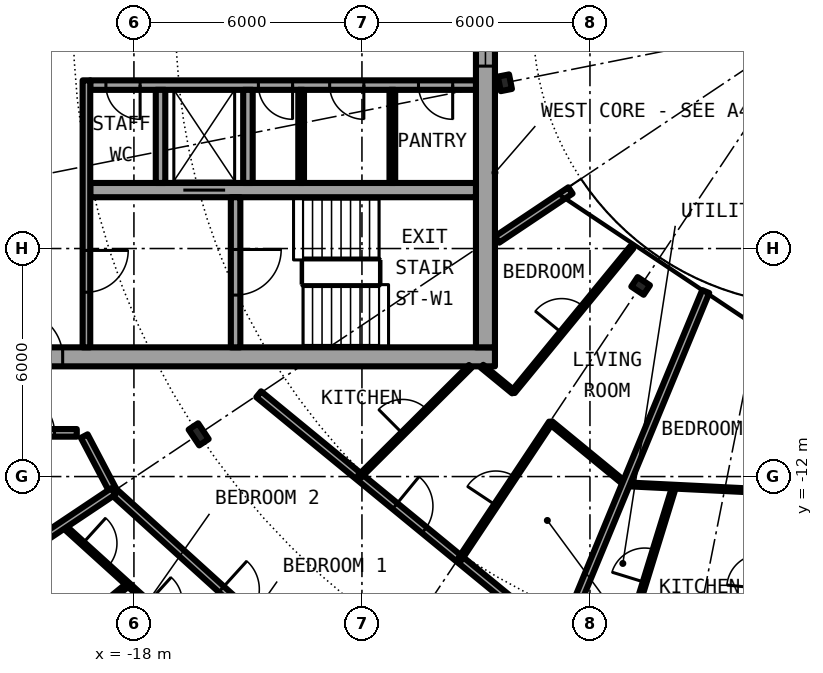
"""IFC4 building model, lengths in metres.
Left out: names, types, materials, properties, quantities, classifications, styles, units other than length and angle.
Written with IfcOpenShell. Run it as: python <this file> out.ifc"""

import sys

from ifc_helpers import new_model, si_unit, direction, frame, frame_2d, origin, origin_2d, place, context, subcontext, project, spatial, rectangle, i_section, extrude, element, fill, save


model = new_model("IFC4")
c1 = context("Model", 3, precision=1e-05, world=origin(), true_north=direction((0.0, 1.0)))
c2 = subcontext(c1, "Body", "Model", "MODEL_VIEW")
j1 = project(units=[si_unit("LENGTHUNIT", "METRE"), si_unit("PLANEANGLEUNIT", "RADIAN")], contexts=[c1])
p1 = place(None, origin())
s1 = spatial("IfcSite", under=j1, at=p1, CompositionType="ELEMENT")
p2 = place(p1, origin())
s2 = spatial("IfcBuilding", under=s1, at=p2, CompositionType="ELEMENT")
p3 = place(p2, frame((0.0, 0.0, 154.35)))
s3 = spatial("IfcBuildingStorey", under=s2, at=p3, CompositionType="ELEMENT", Elevation=154.35)
p4 = place(p3, frame((-16.297, -10.889, 0.0), z_axis=(0.0, 0.0, 1.0), x_axis=(-0.831469612303, -0.55557023302, 0.0)))
e1 = element("IfcColumn", 1, at=p4, inside=s3, PredefinedType="COLUMN", context=c2, shape_type="SweptSolid", body=[
    extrude(i_section(OverallWidth=0.3, OverallDepth=0.5, WebThickness=0.014, FlangeThickness=0.028, FilletRadius=0.027, at=origin_2d()), origin(), (0.0, 0.0, 1.0), 3.05),
])
for number, where, z_axis, x_axis in (
    (2, (-8.239, -1.639, 0.0), (0.0, 0.0, 1.0), (-0.981, -0.195, 0.0)),
    (3, (-4.667, -6.984, 0.0), (0.0, 0.0, 1.0), (-0.556, -0.831, 0.0)),
):
    element("IfcColumn", number, at=place(p3, frame(where, z_axis=z_axis, x_axis=x_axis)), inside=s3, PredefinedType="COLUMN", context=c2, shape_type="SweptSolid", body=[
        extrude(i_section(OverallWidth=0.3, OverallDepth=0.39, WebThickness=0.011, FlangeThickness=0.019, FilletRadius=0.027, at=origin_2d()), origin(), (0.0, 0.0, 1.0), 3.05),
    ])
p5 = place(p3, frame((-22.1, -8.85, 0.0), z_axis=(0.0, 0.0, 1.0), x_axis=(1.0, 0.0, 0.0)))
e4 = element("IfcWall", 4, at=p5, inside=s3, PredefinedType="SHEAR", context=c2, shape_type="SweptSolid", body=[
    extrude(rectangle(XDim=13.6, YDim=0.5, at=frame_2d((6.8, 0.0))), origin(), (0.0, 0.0, 1.0), 3.05),
])
p6 = place(p5, frame((1.025, 0.0, 0.0)))
e5 = element("IfcOpeningElement", 5, at=p6, cuts=e4, PredefinedType="OPENING", context=c2, shape_type="SweptSolid", body=[
    extrude(rectangle(XDim=1.2, YDim=2.3, at=frame_2d((0.6, 1.15))), frame((0.0, 0.26, 0.0), z_axis=(0.0, -1.0, 0.0), x_axis=(1.0, 0.0, 0.0)), (0.0, 0.0, 1.0), 0.52),
])
p7 = place(p3, frame((-8.75, 8.6, 0.0), z_axis=(0.0, 0.0, 1.0), x_axis=(0.0, -1.0, 0.0)))
e6 = element("IfcWall", 6, at=p7, inside=s3, PredefinedType="SHEAR", context=c2, shape_type="SweptSolid", body=[
    extrude(rectangle(XDim=17.2, YDim=0.5, at=frame_2d((8.6, 0.0))), origin(), (0.0, 0.0, 1.0), 3.05),
])
p8 = place(p7, frame((7.4, 0.0, 0.1)))
e7 = element("IfcOpeningElement", 7, at=p8, cuts=e6, PredefinedType="OPENING", context=c2, shape_type="SweptSolid", body=[
    extrude(rectangle(XDim=2.4, YDim=2.2, at=frame_2d((1.2, 1.1))), frame((0.0, 0.26, 0.0), z_axis=(0.0, -1.0, 0.0), x_axis=(1.0, 0.0, 0.0)), (0.0, 0.0, 1.0), 0.52),
])
p9 = place(p3, frame((-9.0, -1.7, 0.0), z_axis=(0.0, 0.0, 1.0), x_axis=(-1.0, 0.0, 0.0)))
e8 = element("IfcWall", 8, at=p9, inside=s3, PredefinedType="SHEAR", context=c2, shape_type="SweptSolid", body=[
    extrude(rectangle(XDim=10.15, YDim=0.25, at=frame_2d((5.075, 0.0))), origin(), (0.0, 0.0, 1.0), 3.05),
])
p10 = place(p9, frame((0.613, 0.0, 0.0)))
e9 = element("IfcOpeningElement", 9, at=p10, cuts=e8, PredefinedType="OPENING", context=c2, shape_type="SweptSolid", body=[
    extrude(rectangle(XDim=0.9, YDim=2.3, at=frame_2d((0.45, 1.15))), frame((0.0, 0.135, 0.0), z_axis=(0.0, -1.0, 0.0), x_axis=(1.0, 0.0, 0.0)), (0.0, 0.0, 1.0), 0.27),
])
p11 = place(p9, frame((2.95, 0.0, 0.0)))
e10 = element("IfcOpeningElement", 10, at=p11, cuts=e8, PredefinedType="OPENING", context=c2, shape_type="SweptSolid", body=[
    extrude(rectangle(XDim=0.9, YDim=2.3, at=frame_2d((0.45, 1.15))), frame((0.0, 0.135, 0.0), z_axis=(0.0, -1.0, 0.0), x_axis=(1.0, 0.0, 0.0)), (0.0, 0.0, 1.0), 0.27),
])
p12 = place(p9, frame((4.825, 0.0, 0.0)))
e11 = element("IfcOpeningElement", 11, at=p12, cuts=e8, PredefinedType="OPENING", context=c2, shape_type="SweptSolid", body=[
    extrude(rectangle(XDim=0.9, YDim=2.3, at=frame_2d((0.45, 1.15))), frame((0.0, 0.135, 0.0), z_axis=(0.0, -1.0, 0.0), x_axis=(1.0, 0.0, 0.0)), (0.0, 0.0, 1.0), 0.27),
])
p13 = place(p9, frame((8.837, 0.0, 0.0)))
e12 = element("IfcOpeningElement", 12, at=p13, cuts=e8, PredefinedType="OPENING", context=c2, shape_type="SweptSolid", body=[
    extrude(rectangle(XDim=0.9, YDim=2.3, at=frame_2d((0.45, 1.15))), frame((0.0, 0.135, 0.0), z_axis=(0.0, -1.0, 0.0), x_axis=(1.0, 0.0, 0.0)), (0.0, 0.0, 1.0), 0.27),
])
p14 = place(p3, frame((-9.0, -4.462, 0.0), z_axis=(0.0, 0.0, 1.0), x_axis=(-1.0, 0.0, 0.0)))
e13 = element("IfcWall", 13, at=p14, inside=s3, PredefinedType="SHEAR", context=c2, shape_type="SweptSolid", body=[
    extrude(rectangle(XDim=10.15, YDim=0.375, at=frame_2d((5.075, 0.0))), origin(), (0.0, 0.0, 1.0), 3.05),
])
p15 = place(p14, frame((6.6, 0.0, 0.0)))
e14 = element("IfcOpeningElement", 14, at=p15, cuts=e13, PredefinedType="OPENING", context=c2, shape_type="SweptSolid", body=[
    extrude(rectangle(XDim=1.1, YDim=2.3, at=frame_2d((0.55, 1.15))), frame((0.0, 0.198, 0.0), z_axis=(0.0, -1.0, 0.0), x_axis=(1.0, 0.0, 0.0)), (0.0, 0.0, 1.0), 0.395),
])
p16 = place(p3, frame((-15.325, -4.65, 0.0), z_axis=(0.0, 0.0, 1.0), x_axis=(0.0, -1.0, 0.0)))
e15 = element("IfcWall", 15, at=p16, inside=s3, PredefinedType="SHEAR", context=c2, shape_type="SweptSolid", body=[
    extrude(rectangle(XDim=3.95, YDim=0.25, at=frame_2d((1.975, 0.0))), origin(), (0.0, 0.0, 1.0), 3.05),
])
p17 = place(p16, frame((1.375, 0.0, 0.0)))
e16 = element("IfcOpeningElement", 16, at=p17, cuts=e15, PredefinedType="OPENING", context=c2, shape_type="SweptSolid", body=[
    extrude(rectangle(XDim=1.2, YDim=2.3, at=frame_2d((0.6, 1.15))), frame((0.0, 0.135, 0.0), z_axis=(0.0, -1.0, 0.0), x_axis=(1.0, 0.0, 0.0)), (0.0, 0.0, 1.0), 0.27),
])
for number, where, z_axis, x_axis in (
    (17, (-15.0, -1.825, 0.0), (0.0, 0.0, 1.0), (0.0, -1.0, 0.0)),
    (18, (-17.3, -1.825, 0.0), (0.0, 0.0, 1.0), (0.0, -1.0, 0.0)),
):
    element("IfcWall", number, at=place(p3, frame(where, z_axis=z_axis, x_axis=x_axis)), inside=s3, PredefinedType="SOLIDWALL", context=c2, shape_type="SweptSolid", body=[
        extrude(rectangle(XDim=2.45, YDim=0.25, at=frame_2d((1.225, 0.0))), origin(), (0.0, 0.0, 1.0), 2.7),
    ])
p18 = place(p3, frame((-19.25, -1.575, 0.0), z_axis=(0.0, 0.0, 1.0), x_axis=(0.0, -1.0, 0.0)))
e19 = element("IfcWall", 19, at=p18, inside=s3, PredefinedType="SOLIDWALL", context=c2, shape_type="SweptSolid", body=[
    extrude(rectangle(XDim=7.025, YDim=0.2, at=frame_2d((3.513, 0.0))), origin(), (0.0, 0.0, 1.0), 2.7),
])
p19 = place(p18, frame((4.475, 0.0, 0.0)))
e20 = element("IfcOpeningElement", 20, at=p19, cuts=e19, PredefinedType="OPENING", context=c2, shape_type="SweptSolid", body=[
    extrude(rectangle(XDim=1.1, YDim=2.3, at=frame_2d((0.55, 1.15))), frame((0.0, 0.11, 0.0), z_axis=(0.0, -1.0, 0.0), x_axis=(1.0, 0.0, 0.0)), (0.0, 0.0, 1.0), 0.22),
])
for number, where, z_axis, x_axis in (
    (21, (-11.2, -1.825, 0.0), (0.0, 0.0, 1.0), (0.0, -1.0, 0.0)),
    (22, (-13.6, -1.825, 0.0), (0.0, 0.0, 1.0), (0.0, -1.0, 0.0)),
):
    element("IfcWall", number, at=place(p3, frame(where, z_axis=z_axis, x_axis=x_axis)), inside=s3, PredefinedType="PARTITIONING", context=c2, shape_type="SweptSolid", body=[
        extrude(rectangle(XDim=2.45, YDim=0.15, at=frame_2d((1.225, 0.0))), origin(), (0.0, 0.0, 1.0), 2.7),
    ])
p20 = place(p3, frame((-19.869, -13.284, 0.0), z_axis=(0.0, 0.0, 1.0), x_axis=(0.741104058203, -0.67139018083, 0.0)))
e23 = element("IfcWall", 23, at=p20, inside=s3, PredefinedType="PARTITIONING", context=c2, shape_type="SweptSolid", body=[
    extrude(rectangle(XDim=6.969, YDim=0.1, at=frame_2d((3.484, 0.0))), origin(), (0.0, 0.0, 1.0), 2.7),
])
p21 = place(p20, frame((3.028, 0.0, 0.0)))
e24 = element("IfcOpeningElement", 24, at=p21, cuts=e23, PredefinedType="OPENING", context=c2, shape_type="SweptSolid", body=[
    extrude(rectangle(XDim=0.9, YDim=2.3, at=frame_2d((0.45, 1.15))), frame((0.0, 0.06, 0.0), z_axis=(0.0, -1.0, 0.0), x_axis=(1.0, 0.0, 0.0)), (0.0, 0.0, 1.0), 0.12),
])
p22 = place(p20, frame((0.705, 0.0, 0.0)))
e25 = element("IfcOpeningElement", 25, at=p22, cuts=e23, PredefinedType="OPENING", context=c2, shape_type="SweptSolid", body=[
    extrude(rectangle(XDim=0.9, YDim=2.3, at=frame_2d((0.45, 1.15))), frame((0.0, 0.06, 0.0), z_axis=(0.0, -1.0, 0.0), x_axis=(1.0, 0.0, 0.0)), (0.0, 0.0, 1.0), 0.12),
])
p23 = place(p3, frame((-19.307, -10.935, 0.0), z_axis=(0.0, 0.0, 1.0), x_axis=(0.465605550524, -0.884992356646, 0.0)))
e26 = element("IfcWall", 26, at=p23, inside=s3, PredefinedType="PARTITIONING", context=c2, shape_type="SweptSolid", body=[
    extrude(rectangle(XDim=1.643, YDim=0.2, at=frame_2d((0.821, 0.0))), origin(), (0.0, 0.0, 1.0), 2.7),
])
p24 = place(p3, frame((-18.542, -12.389, 0.0), z_axis=(0.0, 0.0, 1.0), x_axis=(0.740979597636, -0.671527539188, 0.0)))
e27 = element("IfcWall", 27, at=p24, inside=s3, PredefinedType="PARTITIONING", context=c2, shape_type="SweptSolid", body=[
    extrude(rectangle(XDim=10.841, YDim=0.2, at=frame_2d((5.42, 0.0))), origin(), (0.0, 0.0, 1.0), 2.7),
])
p25 = place(p24, frame((3.835, 0.0, 0.0)))
e28 = element("IfcOpeningElement", 28, at=p25, cuts=e27, PredefinedType="OPENING", context=c2, shape_type="SweptSolid", body=[
    extrude(rectangle(XDim=1.0, YDim=2.3, at=frame_2d((0.5, 1.15))), frame((0.0, 0.11, 0.0), z_axis=(0.0, -1.0, 0.0), x_axis=(1.0, 0.0, 0.0)), (0.0, 0.0, 1.0), 0.22),
])
p26 = place(p3, frame((-14.717, -9.834, 0.0), z_axis=(0.0, 0.0, 1.0), x_axis=(0.773034536097, -0.634363938131, 0.0)))
e29 = element("IfcWall", 29, at=p26, inside=s3, PredefinedType="PARTITIONING", context=c2, shape_type="SweptSolid", body=[
    extrude(rectangle(XDim=10.277, YDim=0.2, at=frame_2d((5.138, 0.0))), origin(), (0.0, 0.0, 1.0), 2.7),
])
p27 = place(p26, frame((4.638, 0.0, 0.0)))
e30 = element("IfcOpeningElement", 30, at=p27, cuts=e29, PredefinedType="OPENING", context=c2, shape_type="SweptSolid", body=[
    extrude(rectangle(XDim=1.0, YDim=2.3, at=frame_2d((0.5, 1.15))), frame((0.0, 0.11, 0.0), z_axis=(0.0, -1.0, 0.0), x_axis=(1.0, 0.0, 0.0)), (0.0, 0.0, 1.0), 0.22),
])
p28 = place(p3, frame((-8.839, -9.098, 0.0), z_axis=(0.0, 0.0, 1.0), x_axis=(0.7731800648, -0.634186555673, 0.0)))
e31 = element("IfcWall", 31, at=p28, inside=s3, PredefinedType="PARTITIONING", context=c2, shape_type="SweptSolid", body=[
    extrude(rectangle(XDim=1.064, YDim=0.1, at=frame_2d((0.532, 0.0))), origin(), (0.0, 0.0, 1.0), 2.7),
])
p29 = place(p3, frame((-7.031, -10.582, 0.0), z_axis=(0.0, 0.0, 1.0), x_axis=(0.772943675046, -0.634474645046, 0.0)))
e32 = element("IfcWall", 32, at=p29, inside=s3, PredefinedType="PARTITIONING", context=c2, shape_type="SweptSolid", body=[
    extrude(rectangle(XDim=2.557, YDim=0.1, at=frame_2d((1.278, 0.0))), origin(), (0.0, 0.0, 1.0), 2.7),
])
p30 = place(p3, frame((-5.06, -12.203, 0.0), z_axis=(0.0, 0.0, 1.0), x_axis=(0.998784958727, -0.049280891026, 0.0)))
e33 = element("IfcWall", 33, at=p30, inside=s3, PredefinedType="PARTITIONING", context=c2, shape_type="SweptSolid", body=[
    extrude(rectangle(XDim=3.82, YDim=0.1, at=frame_2d((1.91, 0.0))), origin(), (0.0, 0.0, 1.0), 2.7),
])
p31 = place(p3, frame((-21.675, -10.85, 0.0), z_axis=(0.0, 0.0, 1.0), x_axis=(1.0, 0.0, 0.0)))
e34 = element("IfcWall", 34, at=p31, inside=s3, PredefinedType="PARTITIONING", context=c2, shape_type="SweptSolid", body=[
    extrude(rectangle(XDim=2.171, YDim=0.2, at=frame_2d((1.085, 0.0))), origin(), (0.0, 0.0, 1.0), 2.7),
])
p32 = place(p31, frame((0.585, 0.0, 0.0)))
e35 = element("IfcOpeningElement", 35, at=p32, cuts=e34, PredefinedType="OPENING", context=c2, shape_type="SweptSolid", body=[
    extrude(rectangle(XDim=1.0, YDim=2.3, at=frame_2d((0.5, 1.15))), frame((0.0, 0.11, 0.0), z_axis=(0.0, -1.0, 0.0), x_axis=(1.0, 0.0, 0.0)), (0.0, 0.0, 1.0), 0.22),
])
p33 = place(p3, frame((-6.513, -4.472, 0.0), z_axis=(0.0, 0.0, 1.0), x_axis=(-0.83133816625, -0.555766905579, 0.0)))
e36 = element("IfcWall", 36, at=p33, inside=s3, PredefinedType="PARTITIONING", context=c2, shape_type="SweptSolid", body=[
    extrude(rectangle(XDim=2.323, YDim=0.2, at=frame_2d((1.162, 0.0))), origin(), (0.0, 0.0, 1.0), 2.7),
])
p34 = place(p3, frame((-22.595, -15.098, 0.0), z_axis=(0.0, 0.0, 1.0), x_axis=(0.831387096605, 0.55569370664, 0.0)))
e37 = element("IfcWall", 37, at=p34, inside=s3, PredefinedType="PARTITIONING", context=c2, shape_type="SweptSolid", body=[
    extrude(rectangle(XDim=4.875, YDim=0.2, at=frame_2d((2.438, 0.0))), origin(), (0.0, 0.0, 1.0), 2.7),
])
p35 = place(p3, frame((-21.04, -17.199, 0.0), z_axis=(0.0, 0.0, 1.0), x_axis=(0.774321581607, 0.63279229472, 0.0)))
e38 = element("IfcWall", 38, at=p35, inside=s3, PredefinedType="PARTITIONING", context=c2, shape_type="SweptSolid", body=[
    extrude(rectangle(XDim=3.731, YDim=0.1, at=frame_2d((1.866, 0.0))), origin(), (0.0, 0.0, 1.0), 2.7),
])
p36 = place(p3, frame((-12.069, -12.007, 0.0), z_axis=(0.0, 0.0, 1.0), x_axis=(0.708822693149, 0.705386695138, 0.0)))
e39 = element("IfcWall", 39, at=p36, inside=s3, PredefinedType="PARTITIONING", context=c2, shape_type="SweptSolid", body=[
    extrude(rectangle(XDim=4.121, YDim=0.1, at=frame_2d((2.061, 0.0))), origin(), (0.0, 0.0, 1.0), 2.7),
])
p37 = place(p36, frame((1.611, 0.0, 0.0)))
e40 = element("IfcOpeningElement", 40, at=p37, cuts=e39, PredefinedType="OPENING", context=c2, shape_type="SweptSolid", body=[
    extrude(rectangle(XDim=0.9, YDim=2.3, at=frame_2d((0.45, 1.15))), frame((0.0, 0.06, 0.0), z_axis=(0.0, -1.0, 0.0), x_axis=(1.0, 0.0, 0.0)), (0.0, 0.0, 1.0), 0.12),
])
p38 = place(p3, frame((-9.425, -14.177, 0.0), z_axis=(0.0, 0.0, 1.0), x_axis=(0.553865036342, 0.832606462573, 0.0)))
e41 = element("IfcWall", 41, at=p38, inside=s3, PredefinedType="PARTITIONING", context=c2, shape_type="SweptSolid", body=[
    extrude(rectangle(XDim=4.319, YDim=0.1, at=frame_2d((2.159, 0.0))), origin(), (0.0, 0.0, 1.0), 2.7),
])
p39 = place(p38, frame((1.709, 0.0, 0.0)))
e42 = element("IfcOpeningElement", 42, at=p39, cuts=e41, PredefinedType="OPENING", context=c2, shape_type="SweptSolid", body=[
    extrude(rectangle(XDim=0.9, YDim=2.3, at=frame_2d((0.45, 1.15))), frame((0.0, 0.06, 0.0), z_axis=(0.0, -1.0, 0.0), x_axis=(1.0, 0.0, 0.0)), (0.0, 0.0, 1.0), 0.12),
])
p40 = place(p3, frame((-8.019, -9.771, 0.0), z_axis=(0.0, 0.0, 1.0), x_axis=(0.634401778971, 0.773003481776, 0.0)))
e43 = element("IfcWall", 43, at=p40, inside=s3, PredefinedType="PARTITIONING", context=c2, shape_type="SweptSolid", body=[
    extrude(rectangle(XDim=4.92, YDim=0.1, at=frame_2d((2.46, 0.0))), origin(), (0.0, 0.0, 1.0), 2.7),
])
p41 = place(p40, frame((2.01, 0.0, 0.0)))
e44 = element("IfcOpeningElement", 44, at=p41, cuts=e43, PredefinedType="OPENING", context=c2, shape_type="SweptSolid", body=[
    extrude(rectangle(XDim=0.9, YDim=2.3, at=frame_2d((0.45, 1.15))), frame((0.0, 0.06, 0.0), z_axis=(0.0, -1.0, 0.0), x_axis=(1.0, 0.0, 0.0)), (0.0, 0.0, 1.0), 0.12),
])
p42 = place(p3, frame((-6.774, -16.353, 0.0), z_axis=(0.0, 0.0, 1.0), x_axis=(0.382716169203, 0.92386597179, 0.0)))
e45 = element("IfcWall", 45, at=p42, inside=s3, PredefinedType="PARTITIONING", context=c2, shape_type="SweptSolid", body=[
    extrude(rectangle(XDim=9.981, YDim=0.2, at=frame_2d((4.99, 0.0))), origin(), (0.0, 0.0, 1.0), 2.7),
])
p43 = place(p3, frame((-5.072, -16.436, 0.0), z_axis=(0.0, 0.0, 1.0), x_axis=(0.294934866503, 0.955517359612, 0.0)))
e46 = element("IfcWall", 46, at=p43, inside=s3, PredefinedType="PARTITIONING", context=c2, shape_type="SweptSolid", body=[
    extrude(rectangle(XDim=4.364, YDim=0.1, at=frame_2d((2.182, 0.0))), origin(), (0.0, 0.0, 1.0), 2.7),
])
p44 = place(p43, frame((1.732, 0.0, 0.0)))
e47 = element("IfcOpeningElement", 47, at=p44, cuts=e46, PredefinedType="OPENING", context=c2, shape_type="SweptSolid", body=[
    extrude(rectangle(XDim=0.9, YDim=2.3, at=frame_2d((0.45, 1.15))), frame((0.0, 0.06, 0.0), z_axis=(0.0, -1.0, 0.0), x_axis=(1.0, 0.0, 0.0)), (0.0, 0.0, 1.0), 0.12),
])
p45 = place(p15, origin())
e48 = element("IfcDoor", 48, at=p45, inside=s3, OperationType="DOUBLE_DOOR_SLIDING", PredefinedType="DOOR", context=c2, shape_type="SweptSolid", body=[
    extrude(rectangle(XDim=1.1, YDim=2.3, at=frame_2d((0.55, 1.15))), frame((0.0, 0.025, 0.0), z_axis=(0.0, -1.0, 0.0), x_axis=(1.0, 0.0, 0.0)), (0.0, 0.0, 1.0), 0.05),
])
fill(e14, e48)
p46 = place(p10, origin())
e49 = element("IfcDoor", 49, at=p46, inside=s3, OperationType="SINGLE_SWING_RIGHT", PredefinedType="DOOR", context=c2, shape_type="SweptSolid", body=[
    extrude(rectangle(XDim=0.9, YDim=2.3, at=frame_2d((0.45, 1.15))), frame((0.0, 0.025, 0.0), z_axis=(0.0, -1.0, 0.0), x_axis=(1.0, 0.0, 0.0)), (0.0, 0.0, 1.0), 0.05),
])
fill(e9, e49)
p47 = place(p11, origin())
e50 = element("IfcDoor", 50, at=p47, inside=s3, OperationType="SINGLE_SWING_RIGHT", PredefinedType="DOOR", context=c2, shape_type="SweptSolid", body=[
    extrude(rectangle(XDim=0.9, YDim=2.3, at=frame_2d((0.45, 1.15))), frame((0.0, 0.025, 0.0), z_axis=(0.0, -1.0, 0.0), x_axis=(1.0, 0.0, 0.0)), (0.0, 0.0, 1.0), 0.05),
])
fill(e10, e50)
p48 = place(p12, origin())
e51 = element("IfcDoor", 51, at=p48, inside=s3, OperationType="SINGLE_SWING_LEFT", PredefinedType="DOOR", context=c2, shape_type="SweptSolid", body=[
    extrude(rectangle(XDim=0.9, YDim=2.3, at=frame_2d((0.45, 1.15))), frame((0.0, 0.025, 0.0), z_axis=(0.0, -1.0, 0.0), x_axis=(1.0, 0.0, 0.0)), (0.0, 0.0, 1.0), 0.05),
])
fill(e11, e51)
p49 = place(p13, origin())
e52 = element("IfcDoor", 52, at=p49, inside=s3, OperationType="SINGLE_SWING_LEFT", PredefinedType="DOOR", context=c2, shape_type="SweptSolid", body=[
    extrude(rectangle(XDim=0.9, YDim=2.3, at=frame_2d((0.45, 1.15))), frame((0.0, 0.025, 0.0), z_axis=(0.0, -1.0, 0.0), x_axis=(1.0, 0.0, 0.0)), (0.0, 0.0, 1.0), 0.05),
])
fill(e12, e52)
p50 = place(p17, origin())
e53 = element("IfcDoor", 53, at=p50, inside=s3, OperationType="SINGLE_SWING_LEFT", PredefinedType="DOOR", context=c2, shape_type="SweptSolid", body=[
    extrude(rectangle(XDim=1.2, YDim=2.3, at=frame_2d((0.6, 1.15))), frame((0.0, 0.025, 0.0), z_axis=(0.0, -1.0, 0.0), x_axis=(1.0, 0.0, 0.0)), (0.0, 0.0, 1.0), 0.05),
])
fill(e16, e53)
p51 = place(p19, origin())
e54 = element("IfcDoor", 54, at=p51, inside=s3, OperationType="SINGLE_SWING_LEFT", PredefinedType="DOOR", context=c2, shape_type="SweptSolid", body=[
    extrude(rectangle(XDim=1.1, YDim=2.3, at=frame_2d((0.55, 1.15))), frame((0.0, 0.025, 0.0), z_axis=(0.0, -1.0, 0.0), x_axis=(1.0, 0.0, 0.0)), (0.0, 0.0, 1.0), 0.05),
])
fill(e20, e54)
p52 = place(p6, origin())
e55 = element("IfcDoor", 55, at=p52, inside=s3, OperationType="SINGLE_SWING_RIGHT", PredefinedType="DOOR", context=c2, shape_type="SweptSolid", body=[
    extrude(rectangle(XDim=1.2, YDim=2.3, at=frame_2d((0.6, 1.15))), frame((0.0, 0.025, 0.0), z_axis=(0.0, -1.0, 0.0), x_axis=(1.0, 0.0, 0.0)), (0.0, 0.0, 1.0), 0.05),
])
fill(e5, e55)
p53 = place(p8, origin())
e56 = element("IfcWindow", 56, at=p53, inside=s3, PartitioningType="SINGLE_PANEL", PredefinedType="WINDOW", context=c2, shape_type="SweptSolid", body=[
    extrude(rectangle(XDim=2.4, YDim=2.2, at=frame_2d((1.2, 1.1))), frame((0.0, 0.03, 0.0), z_axis=(0.0, -1.0, 0.0), x_axis=(1.0, 0.0, 0.0)), (0.0, 0.0, 1.0), 0.06),
])
fill(e7, e56)
p54 = place(p25, origin())
e57 = element("IfcDoor", 57, at=p54, inside=s3, OperationType="SINGLE_SWING_LEFT", PredefinedType="DOOR", context=c2, shape_type="SweptSolid", body=[
    extrude(rectangle(XDim=1.0, YDim=2.3, at=frame_2d((0.5, 1.15))), frame((0.0, 0.025, 0.0), z_axis=(0.0, -1.0, 0.0), x_axis=(1.0, 0.0, 0.0)), (0.0, 0.0, 1.0), 0.05),
])
fill(e28, e57)
p55 = place(p22, origin())
e58 = element("IfcDoor", 58, at=p55, inside=s3, OperationType="SINGLE_SWING_LEFT", PredefinedType="DOOR", context=c2, shape_type="SweptSolid", body=[
    extrude(rectangle(XDim=0.9, YDim=2.3, at=frame_2d((0.45, 1.15))), frame((0.0, 0.025, 0.0), z_axis=(0.0, -1.0, 0.0), x_axis=(1.0, 0.0, 0.0)), (0.0, 0.0, 1.0), 0.05),
])
fill(e25, e58)
p56 = place(p27, origin())
e59 = element("IfcDoor", 59, at=p56, inside=s3, OperationType="SINGLE_SWING_LEFT", PredefinedType="DOOR", context=c2, shape_type="SweptSolid", body=[
    extrude(rectangle(XDim=1.0, YDim=2.3, at=frame_2d((0.5, 1.15))), frame((0.0, 0.025, 0.0), z_axis=(0.0, -1.0, 0.0), x_axis=(1.0, 0.0, 0.0)), (0.0, 0.0, 1.0), 0.05),
])
fill(e30, e59)
p57 = place(p39, origin())
e60 = element("IfcDoor", 60, at=p57, inside=s3, OperationType="SINGLE_SWING_LEFT", PredefinedType="DOOR", context=c2, shape_type="SweptSolid", body=[
    extrude(rectangle(XDim=0.9, YDim=2.3, at=frame_2d((0.45, 1.15))), frame((0.0, 0.025, 0.0), z_axis=(0.0, -1.0, 0.0), x_axis=(1.0, 0.0, 0.0)), (0.0, 0.0, 1.0), 0.05),
])
fill(e42, e60)
p58 = place(p37, origin())
e61 = element("IfcDoor", 61, at=p58, inside=s3, OperationType="SINGLE_SWING_RIGHT", PredefinedType="DOOR", context=c2, shape_type="SweptSolid", body=[
    extrude(rectangle(XDim=0.9, YDim=2.3, at=frame_2d((0.45, 1.15))), frame((0.0, 0.025, 0.0), z_axis=(0.0, -1.0, 0.0), x_axis=(1.0, 0.0, 0.0)), (0.0, 0.0, 1.0), 0.05),
])
fill(e40, e61)
p59 = place(p41, origin())
e62 = element("IfcDoor", 62, at=p59, inside=s3, OperationType="SINGLE_SWING_LEFT", PredefinedType="DOOR", context=c2, shape_type="SweptSolid", body=[
    extrude(rectangle(XDim=0.9, YDim=2.3, at=frame_2d((0.45, 1.15))), frame((0.0, 0.025, 0.0), z_axis=(0.0, -1.0, 0.0), x_axis=(1.0, 0.0, 0.0)), (0.0, 0.0, 1.0), 0.05),
])
fill(e44, e62)
p60 = place(p44, origin())
e63 = element("IfcDoor", 63, at=p60, inside=s3, OperationType="SINGLE_SWING_RIGHT", PredefinedType="DOOR", context=c2, shape_type="SweptSolid", body=[
    extrude(rectangle(XDim=0.9, YDim=2.3, at=frame_2d((0.45, 1.15))), frame((0.0, 0.025, 0.0), z_axis=(0.0, -1.0, 0.0), x_axis=(1.0, 0.0, 0.0)), (0.0, 0.0, 1.0), 0.05),
])
fill(e47, e63)
p61 = place(p32, origin())
e64 = element("IfcDoor", 64, at=p61, inside=s3, OperationType="SINGLE_SWING_LEFT", PredefinedType="DOOR", context=c2, shape_type="SweptSolid", body=[
    extrude(rectangle(XDim=1.0, YDim=2.3, at=frame_2d((0.5, 1.15))), frame((0.0, 0.025, 0.0), z_axis=(0.0, -1.0, 0.0), x_axis=(1.0, 0.0, 0.0)), (0.0, 0.0, 1.0), 0.05),
])
fill(e35, e64)
save(model, sys.argv[1])
